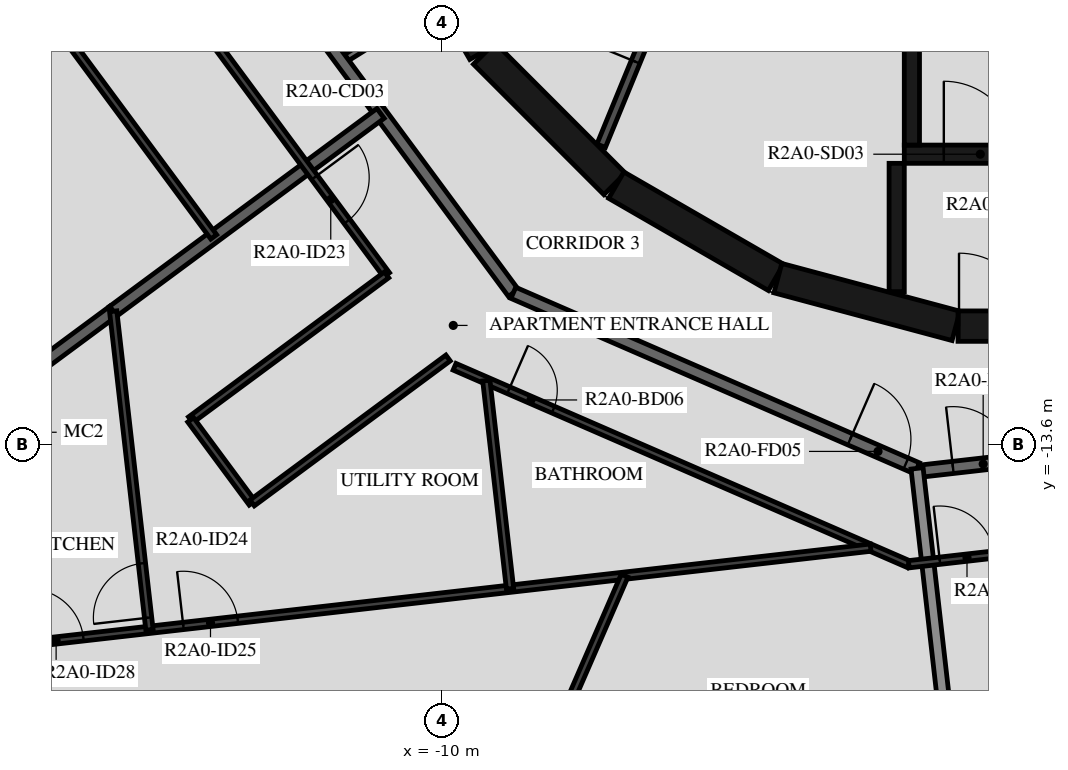
"""IFC4 building model, lengths in metres.
Left out: names, types, materials, properties, quantities, classifications, styles, units other than length and angle.
Written with IfcOpenShell. Run it as: python <this file> out.ifc"""

import sys

from ifc_helpers import new_model, si_unit, direction, frame, frame_2d, origin, place, context, subcontext, project, spatial, rectangle, extrude, element, fill, save


model = new_model("IFC4")
c1 = context("Model", 3, precision=1e-05, world=origin(), true_north=direction((0.0, 1.0)))
c2 = subcontext(c1, "Body", "Model", "MODEL_VIEW")
j1 = project(units=[si_unit("LENGTHUNIT", "METRE"), si_unit("PLANEANGLEUNIT", "RADIAN")], contexts=[c1])
p1 = place(None, origin())
s1 = spatial("IfcSite", under=j1, at=p1, CompositionType="ELEMENT")
p2 = place(p1, origin())
s2 = spatial("IfcBuilding", under=s1, at=p2, CompositionType="ELEMENT")
p3 = place(p2, frame((0.0, 0.0, 76.7)))
s3 = spatial("IfcBuildingStorey", under=s2, at=p3, CompositionType="ELEMENT", Elevation=76.7)
p4 = place(p3, frame((-10.845, -4.51, 0.0), z_axis=(0.0, 0.0, 1.0), x_axis=(0.500087131594, -0.865975092491, 0.0)))
e1 = element("IfcWall", 1, at=p4, inside=s3, PredefinedType="SHEAR", context=c2, shape_type="SweptSolid", body=[
    extrude(rectangle(XDim=3.033, YDim=0.5, at=frame_2d((1.516, 0.0))), origin(), (0.0, 0.0, 1.0), 3.12),
])
p5 = place(p3, frame((-9.308, -7.164, 0.0), z_axis=(0.0, 0.0, 1.0), x_axis=(0.707106781187, -0.707106781187, 0.0)))
e2 = element("IfcWall", 2, at=p5, inside=s3, PredefinedType="SHEAR", context=c2, shape_type="SweptSolid", body=[
    extrude(rectangle(XDim=3.032, YDim=0.5, at=frame_2d((1.516, 0.0))), origin(), (0.0, 0.0, 1.0), 3.12),
])
for number, where, z_axis, x_axis in (
    (3, (-7.137, -9.329, 0.0), (0.0, 0.0, 1.0), (0.866, -0.5, 0.0)),
    (4, (-4.479, -10.858, 0.0), (0.0, 0.0, 1.0), (0.966, -0.259, 0.0)),
):
    element("IfcWall", number, at=place(p3, frame(where, z_axis=z_axis, x_axis=x_axis)), inside=s3, PredefinedType="SHEAR", context=c2, shape_type="SweptSolid", body=[
        extrude(rectangle(XDim=3.033, YDim=0.5, at=frame_2d((1.516, 0.0))), origin(), (0.0, 0.0, 1.0), 3.12),
    ])
p6 = place(p3, frame((-1.516, -11.647, 0.0), z_axis=(0.0, 0.0, 1.0), x_axis=(1.0, 0.0, 0.0)))
e5 = element("IfcWall", 5, at=p6, inside=s3, PredefinedType="SHEAR", context=c2, shape_type="SweptSolid", body=[
    extrude(rectangle(XDim=3.033, YDim=0.5, at=frame_2d((1.516, 0.0))), origin(), (0.0, 0.0, 1.0), 3.12),
])
p7 = place(p6, frame((0.016, 0.0, 0.0)))
e6 = element("IfcOpeningElement", 6, at=p7, cuts=e5, PredefinedType="OPENING", context=c2, shape_type="SweptSolid", body=[
    extrude(rectangle(XDim=1.2, YDim=2.1, at=frame_2d((0.6, 1.05))), frame((0.0, 0.26, 0.0), z_axis=(0.0, -1.0, 0.0), x_axis=(1.0, 0.0, 0.0)), (0.0, 0.0, 1.0), 0.52),
])
p8 = place(p3, frame((-2.275, -8.67, 0.0), z_axis=(0.0, 0.0, 1.0), x_axis=(0.0, 1.0, 0.0)))
e7 = element("IfcWall", 7, at=p8, inside=s3, PredefinedType="SHEAR", context=c2, shape_type="SweptSolid", body=[
    extrude(rectangle(XDim=3.32, YDim=0.25, at=frame_2d((1.66, 0.0))), origin(), (0.0, 0.0, 1.0), 3.12),
])
p9 = place(p3, frame((-2.4, -8.82, 0.0), z_axis=(0.0, 0.0, 1.0), x_axis=(1.0, 0.0, 0.0)))
e8 = element("IfcWall", 8, at=p9, inside=s3, PredefinedType="SHEAR", context=c2, shape_type="SweptSolid", body=[
    extrude(rectangle(XDim=2.5, YDim=0.3, at=frame_2d((1.25, 0.0))), origin(), (0.0, 0.0, 1.0), 3.12),
])
p10 = place(p9, frame((0.65, 0.0, 0.0)))
e9 = element("IfcOpeningElement", 9, at=p10, cuts=e8, PredefinedType="OPENING", context=c2, shape_type="SweptSolid", body=[
    extrude(rectangle(XDim=1.2, YDim=2.1, at=frame_2d((0.6, 1.05))), frame((0.0, 0.16, 0.0), z_axis=(0.0, -1.0, 0.0), x_axis=(1.0, 0.0, 0.0)), (0.0, 0.0, 1.0), 0.32),
])
p11 = place(p3, frame((-2.525, -8.97, 0.0), z_axis=(0.0, 0.0, 1.0), x_axis=(0.0, -1.0, 0.0)))
e10 = element("IfcWall", 10, at=p11, inside=s3, PredefinedType="SHEAR", context=c2, shape_type="SweptSolid", body=[
    extrude(rectangle(XDim=2.11, YDim=0.25, at=frame_2d((1.055, 0.0))), origin(), (0.0, 0.0, 1.0), 3.12),
])
p12 = place(p3, frame((-7.385, -8.681, 0.0), z_axis=(0.0, 0.0, 1.0), x_axis=(0.379804590409, 0.925066739811, 0.0)))
e11 = element("IfcWall", 11, at=p12, inside=s3, PredefinedType="PARTITIONING", context=c2, shape_type="SweptSolid", body=[
    extrude(rectangle(XDim=3.885, YDim=0.15, at=frame_2d((1.942, 0.0))), origin(), (0.0, 0.0, 1.0), 3.12),
])
p13 = place(p12, frame((1.493, 0.0, 0.0)))
e12 = element("IfcOpeningElement", 12, at=p13, cuts=e11, PredefinedType="OPENING", context=c2, shape_type="SweptSolid", body=[
    extrude(rectangle(XDim=0.9, YDim=2.1, at=frame_2d((0.45, 1.05))), frame((0.0, 0.085, 0.0), z_axis=(0.0, -1.0, 0.0), x_axis=(1.0, 0.0, 0.0)), (0.0, 0.0, 1.0), 0.17),
])
p14 = place(p3, frame((-11.654, -7.282, 0.0), z_axis=(0.0, 0.0, 1.0), x_axis=(0.848117698675, 0.529807860638, 0.0)))
e13 = element("IfcWall", 13, at=p14, inside=s3, PredefinedType="PARTITIONING", context=c2, shape_type="SweptSolid", body=[
    extrude(rectangle(XDim=1.838, YDim=0.12, at=frame_2d((0.919, 0.0))), origin(), (0.0, 0.0, 1.0), 3.12),
])
p15 = place(p14, frame((0.115, 0.0, 0.0)))
e14 = element("IfcOpeningElement", 14, at=p15, cuts=e13, PredefinedType="OPENING", context=c2, shape_type="SweptSolid", body=[
    extrude(rectangle(XDim=1.2, YDim=2.1, at=frame_2d((0.6, 1.05))), frame((0.0, 0.07, 0.0), z_axis=(0.0, -1.0, 0.0), x_axis=(1.0, 0.0, 0.0)), (0.0, 0.0, 1.0), 0.14),
])
p16 = place(p3, frame((-13.196, -5.198, 0.0), z_axis=(0.0, 0.0, 1.0), x_axis=(0.594805187394, -0.803869883159, 0.0)))
e15 = element("IfcWall", 15, at=p16, inside=s3, PredefinedType="STANDARD", context=c2, shape_type="SweptSolid", body=[
    extrude(rectangle(XDim=7.342, YDim=0.2, at=frame_2d((3.671, 0.0))), origin(), (0.0, 0.0, 1.0), 3.12),
])
p17 = place(p3, frame((-8.829, -11.1, 0.0), z_axis=(0.0, 0.0, 1.0), x_axis=(0.917063622491, -0.398740908742, 0.0)))
e16 = element("IfcWall", 16, at=p17, inside=s3, PredefinedType="STANDARD", context=c2, shape_type="SweptSolid", body=[
    extrude(rectangle(XDim=7.24, YDim=0.2, at=frame_2d((3.62, 0.0))), origin(), (0.0, 0.0, 1.0), 3.12),
])
p18 = place(p17, frame((6.04, 0.0, 0.0)))
e17 = element("IfcOpeningElement", 17, at=p18, cuts=e16, PredefinedType="OPENING", context=c2, shape_type="SweptSolid", body=[
    extrude(rectangle(XDim=1.0, YDim=2.1, at=frame_2d((0.5, 1.05))), frame((0.0, 0.11, 0.0), z_axis=(0.0, -1.0, 0.0), x_axis=(1.0, 0.0, 0.0)), (0.0, 0.0, 1.0), 0.22),
])
p19 = place(p3, frame((-2.096, -14.028, 0.0), z_axis=(0.0, 0.0, 1.0), x_axis=(0.993569170114, 0.113226782163, 0.0)))
e18 = element("IfcWall", 18, at=p19, inside=s3, PredefinedType="STANDARD", context=c2, shape_type="SweptSolid", body=[
    extrude(rectangle(XDim=7.342, YDim=0.2, at=frame_2d((3.671, 0.0))), origin(), (0.0, 0.0, 1.0), 3.12),
])
p20 = place(p19, frame((0.5, 0.0, 0.0)))
e19 = element("IfcOpeningElement", 19, at=p20, cuts=e18, PredefinedType="OPENING", context=c2, shape_type="SweptSolid", body=[
    extrude(rectangle(XDim=1.0, YDim=2.1, at=frame_2d((0.5, 1.05))), frame((0.0, 0.11, 0.0), z_axis=(0.0, -1.0, 0.0), x_axis=(1.0, 0.0, 0.0)), (0.0, 0.0, 1.0), 0.22),
])
p21 = place(p3, frame((-15.41, -11.403, 0.0), z_axis=(0.0, 0.0, 1.0), x_axis=(0.803887568227, 0.594781285558, 0.0)))
e20 = element("IfcWall", 20, at=p21, inside=s3, PredefinedType="STANDARD", context=c2, shape_type="SweptSolid", body=[
    extrude(rectangle(XDim=5.47, YDim=0.2, at=frame_2d((2.735, 0.0))), origin(), (0.0, 0.0, 1.0), 3.12),
])
p22 = place(p3, frame((-16.649, -12.32, 0.0), z_axis=(0.0, 0.0, 1.0), x_axis=(0.803804030903, 0.594894175383, 0.0)))
e21 = element("IfcWall", 21, at=p22, inside=s3, PredefinedType="STANDARD", context=c2, shape_type="SweptSolid", body=[
    extrude(rectangle(XDim=1.542, YDim=0.2, at=frame_2d((0.771, 0.0))), origin(), (0.0, 0.0, 1.0), 3.12),
])
p23 = place(p3, frame((-1.555, -19.559, 0.0), z_axis=(0.0, 0.0, 1.0), x_axis=(-0.113221250863, 0.993569800443, 0.0)))
e22 = element("IfcWall", 22, at=p23, inside=s3, PredefinedType="STANDARD", context=c2, shape_type="SweptSolid", body=[
    extrude(rectangle(XDim=5.609, YDim=0.2, at=frame_2d((2.804, 0.0))), origin(), (0.0, 0.0, 1.0), 2.73),
])
p24 = place(p3, frame((-14.641, -5.767, 0.0), z_axis=(0.0, 0.0, 1.0), x_axis=(0.594825885962, -0.803854567313, 0.0)))
e23 = element("IfcWall", 23, at=p24, inside=s3, PredefinedType="PARTITIONING", context=c2, shape_type="SweptSolid", body=[
    extrude(rectangle(XDim=6.266, YDim=0.12, at=frame_2d((3.133, 0.0))), origin(), (0.0, 0.0, 1.0), 3.12),
])
p25 = place(p24, frame((4.273, 0.0, 0.0)))
e24 = element("IfcOpeningElement", 24, at=p25, cuts=e23, PredefinedType="OPENING", context=c2, shape_type="SweptSolid", body=[
    extrude(rectangle(XDim=0.9, YDim=2.1, at=frame_2d((0.45, 1.05))), frame((0.0, 0.07, 0.0), z_axis=(0.0, -1.0, 0.0), x_axis=(1.0, 0.0, 0.0)), (0.0, 0.0, 1.0), 0.14),
])
p26 = place(p3, frame((-18.084, -4.331, 0.0), z_axis=(0.0, 0.0, 1.0), x_axis=(0.594811782108, -0.803865003508, 0.0)))
e25 = element("IfcWall", 25, at=p26, inside=s3, PredefinedType="PARTITIONING", context=c2, shape_type="SweptSolid", body=[
    extrude(rectangle(XDim=7.276, YDim=0.12, at=frame_2d((3.638, 0.0))), origin(), (0.0, 0.0, 1.0), 3.12),
])
p27 = place(p3, frame((-10.914, -10.804, 0.0), z_axis=(0.0, 0.0, 1.0), x_axis=(-0.803864616889, -0.594812304609, 0.0)))
e26 = element("IfcWall", 26, at=p27, inside=s3, PredefinedType="PARTITIONING", context=c2, shape_type="SweptSolid", body=[
    extrude(rectangle(XDim=4.008, YDim=0.12, at=frame_2d((2.004, 0.0))), origin(), (0.0, 0.0, 1.0), 3.12),
])
p28 = place(p3, frame((-14.136, -13.188, 0.0), z_axis=(0.0, 0.0, 1.0), x_axis=(0.594863421241, -0.803826791087, 0.0)))
e27 = element("IfcWall", 27, at=p28, inside=s3, PredefinedType="PARTITIONING", context=c2, shape_type="SweptSolid", body=[
    extrude(rectangle(XDim=1.7, YDim=0.12, at=frame_2d((0.85, 0.0))), origin(), (0.0, 0.0, 1.0), 3.12),
])
p29 = place(p3, frame((-13.125, -14.555, 0.0), z_axis=(0.0, 0.0, 1.0), x_axis=(0.80389374229, 0.594772940799, 0.0)))
e28 = element("IfcWall", 28, at=p29, inside=s3, PredefinedType="PARTITIONING", context=c2, shape_type="SweptSolid", body=[
    extrude(rectangle(XDim=4.008, YDim=0.12, at=frame_2d((2.004, 0.0))), origin(), (0.0, 0.0, 1.0), 3.12),
])
p30 = place(p3, frame((-9.796, -12.315, 0.0), z_axis=(0.0, 0.0, 1.0), x_axis=(0.917059572812, -0.398750222463, 0.0)))
e29 = element("IfcWall", 29, at=p30, inside=s3, PredefinedType="PARTITIONING", context=c2, shape_type="SweptSolid", body=[
    extrude(rectangle(XDim=8.146, YDim=0.12, at=frame_2d((4.073, 0.0))), origin(), (0.0, 0.0, 1.0), 3.12),
])
p31 = place(p30, frame((0.969, 0.0, 0.0)))
e30 = element("IfcOpeningElement", 30, at=p31, cuts=e29, PredefinedType="OPENING", context=c2, shape_type="SweptSolid", body=[
    extrude(rectangle(XDim=0.8, YDim=2.1, at=frame_2d((0.4, 1.05))), frame((0.0, 0.07, 0.0), z_axis=(0.0, -1.0, 0.0), x_axis=(1.0, 0.0, 0.0)), (0.0, 0.0, 1.0), 0.14),
])
p32 = place(p3, frame((-2.326, -15.563, 0.0), z_axis=(0.0, 0.0, 1.0), x_axis=(0.993575068384, 0.113175012641, 0.0)))
e31 = element("IfcWall", 31, at=p32, inside=s3, PredefinedType="PARTITIONING", context=c2, shape_type="SweptSolid", body=[
    extrude(rectangle(XDim=3.799, YDim=0.12, at=frame_2d((1.899, 0.0))), origin(), (0.0, 0.0, 1.0), 3.12),
])
p33 = place(p32, frame((0.513, 0.0, 0.0)))
e32 = element("IfcOpeningElement", 32, at=p33, cuts=e31, PredefinedType="OPENING", context=c2, shape_type="SweptSolid", body=[
    extrude(rectangle(XDim=0.9, YDim=2.1, at=frame_2d((0.45, 1.05))), frame((0.0, 0.07, 0.0), z_axis=(0.0, -1.0, 0.0), x_axis=(1.0, 0.0, 0.0)), (0.0, 0.0, 1.0), 0.14),
])
p34 = place(p3, frame((-17.437, -16.94, 0.0), z_axis=(0.0, 0.0, 1.0), x_axis=(0.993573314119, 0.113190412448, 0.0)))
e33 = element("IfcWall", 33, at=p34, inside=s3, PredefinedType="PARTITIONING", context=c2, shape_type="SweptSolid", body=[
    extrude(rectangle(XDim=14.576, YDim=0.12, at=frame_2d((7.288, 0.0))), origin(), (0.0, 0.0, 1.0), 3.12),
])
p35 = place(p34, frame((3.201, 0.0, 0.0)))
e34 = element("IfcOpeningElement", 34, at=p35, cuts=e33, PredefinedType="OPENING", context=c2, shape_type="SweptSolid", body=[
    extrude(rectangle(XDim=0.9, YDim=2.1, at=frame_2d((0.45, 1.05))), frame((0.0, 0.07, 0.0), z_axis=(0.0, -1.0, 0.0), x_axis=(1.0, 0.0, 0.0)), (0.0, 0.0, 1.0), 0.14),
])
p36 = place(p34, frame((0.645, 0.0, 0.0)))
e35 = element("IfcOpeningElement", 35, at=p36, cuts=e33, PredefinedType="OPENING", context=c2, shape_type="SweptSolid", body=[
    extrude(rectangle(XDim=0.9, YDim=2.1, at=frame_2d((0.45, 1.05))), frame((0.0, 0.07, 0.0), z_axis=(0.0, -1.0, 0.0), x_axis=(1.0, 0.0, 0.0)), (0.0, 0.0, 1.0), 0.14),
])
p37 = place(p3, frame((-14.813, -16.641, 0.0), z_axis=(0.0, 0.0, 1.0), x_axis=(-0.113210971478, 0.993570971767, 0.0)))
e36 = element("IfcWall", 36, at=p37, inside=s3, PredefinedType="PARTITIONING", context=c2, shape_type="SweptSolid", body=[
    extrude(rectangle(XDim=5.273, YDim=0.12, at=frame_2d((2.636, 0.0))), origin(), (0.0, 0.0, 1.0), 3.12),
])
p38 = place(p37, frame((0.2, 0.0, 0.0)))
e37 = element("IfcOpeningElement", 37, at=p38, cuts=e36, PredefinedType="OPENING", context=c2, shape_type="SweptSolid", body=[
    extrude(rectangle(XDim=0.9, YDim=2.1, at=frame_2d((0.45, 1.05))), frame((0.0, 0.07, 0.0), z_axis=(0.0, -1.0, 0.0), x_axis=(1.0, 0.0, 0.0)), (0.0, 0.0, 1.0), 0.14),
])
p39 = place(p3, frame((-8.884, -15.966, 0.0), z_axis=(0.0, 0.0, 1.0), x_axis=(-0.113230836929, 0.993568708026, 0.0)))
e38 = element("IfcWall", 38, at=p39, inside=s3, PredefinedType="PARTITIONING", context=c2, shape_type="SweptSolid", body=[
    extrude(rectangle(XDim=3.446, YDim=0.12, at=frame_2d((1.723, 0.0))), origin(), (0.0, 0.0, 1.0), 3.12),
])
p40 = place(p3, frame((-9.026, -20.41, 0.0), z_axis=(0.0, 0.0, 1.0), x_axis=(0.398750711167, 0.917059360316, 0.0)))
e39 = element("IfcWall", 39, at=p40, inside=s3, PredefinedType="PARTITIONING", context=c2, shape_type="SweptSolid", body=[
    extrude(rectangle(XDim=5.081, YDim=0.12, at=frame_2d((2.54, 0.0))), origin(), (0.0, 0.0, 1.0), 3.12),
])
p41 = place(p40, frame((0.4, 0.0, 0.0)))
e40 = element("IfcOpeningElement", 40, at=p41, cuts=e39, PredefinedType="OPENING", context=c2, shape_type="SweptSolid", body=[
    extrude(rectangle(XDim=0.9, YDim=2.1, at=frame_2d((0.45, 1.05))), frame((0.0, 0.07, 0.0), z_axis=(0.0, -1.0, 0.0), x_axis=(1.0, 0.0, 0.0)), (0.0, 0.0, 1.0), 0.14),
])
p42 = place(p10, origin())
e41 = element("IfcDoor", 41, at=p42, inside=s3, OperationType="SINGLE_SWING_LEFT", PredefinedType="DOOR", context=c2, shape_type="SweptSolid", body=[
    extrude(rectangle(XDim=1.2, YDim=2.1, at=frame_2d((0.6, 1.05))), frame((0.0, 0.025, 0.0), z_axis=(0.0, -1.0, 0.0), x_axis=(1.0, 0.0, 0.0)), (0.0, 0.0, 1.0), 0.05),
])
fill(e9, e41)
p43 = place(p7, origin())
e42 = element("IfcDoor", 42, at=p43, inside=s3, OperationType="SINGLE_SWING_RIGHT", PredefinedType="DOOR", context=c2, shape_type="SweptSolid", body=[
    extrude(rectangle(XDim=1.2, YDim=2.1, at=frame_2d((0.6, 1.05))), frame((0.0, 0.025, 0.0), z_axis=(0.0, -1.0, 0.0), x_axis=(1.0, 0.0, 0.0)), (0.0, 0.0, 1.0), 0.05),
])
fill(e6, e42)
p44 = place(p13, origin())
e43 = element("IfcDoor", 43, at=p44, inside=s3, OperationType="SINGLE_SWING_LEFT", PredefinedType="DOOR", context=c2, shape_type="SweptSolid", body=[
    extrude(rectangle(XDim=0.9, YDim=2.1, at=frame_2d((0.45, 1.05))), frame((0.0, 0.025, 0.0), z_axis=(0.0, -1.0, 0.0), x_axis=(1.0, 0.0, 0.0)), (0.0, 0.0, 1.0), 0.05),
])
fill(e12, e43)
p45 = place(p18, origin())
e44 = element("IfcDoor", 44, at=p45, inside=s3, OperationType="SINGLE_SWING_LEFT", PredefinedType="DOOR", context=c2, shape_type="SweptSolid", body=[
    extrude(rectangle(XDim=1.0, YDim=2.1, at=frame_2d((0.5, 1.05))), frame((0.0, 0.025, 0.0), z_axis=(0.0, -1.0, 0.0), x_axis=(1.0, 0.0, 0.0)), (0.0, 0.0, 1.0), 0.05),
])
fill(e17, e44)
p46 = place(p25, origin())
e45 = element("IfcDoor", 45, at=p46, inside=s3, OperationType="SINGLE_SWING_LEFT", PredefinedType="DOOR", context=c2, shape_type="SweptSolid", body=[
    extrude(rectangle(XDim=0.9, YDim=2.1, at=frame_2d((0.45, 1.05))), frame((0.0, 0.025, 0.0), z_axis=(0.0, -1.0, 0.0), x_axis=(1.0, 0.0, 0.0)), (0.0, 0.0, 1.0), 0.05),
])
fill(e24, e45)
p47 = place(p31, origin())
e46 = element("IfcDoor", 46, at=p47, inside=s3, OperationType="SINGLE_SWING_LEFT", PredefinedType="DOOR", context=c2, shape_type="SweptSolid", body=[
    extrude(rectangle(XDim=0.8, YDim=2.1, at=frame_2d((0.4, 1.05))), frame((0.0, 0.025, 0.0), z_axis=(0.0, -1.0, 0.0), x_axis=(1.0, 0.0, 0.0)), (0.0, 0.0, 1.0), 0.05),
])
fill(e30, e46)
p48 = place(p38, origin())
e47 = element("IfcDoor", 47, at=p48, inside=s3, OperationType="SINGLE_SWING_LEFT", PredefinedType="DOOR", context=c2, shape_type="SweptSolid", body=[
    extrude(rectangle(XDim=0.9, YDim=2.1, at=frame_2d((0.45, 1.05))), frame((0.0, 0.025, 0.0), z_axis=(0.0, -1.0, 0.0), x_axis=(1.0, 0.0, 0.0)), (0.0, 0.0, 1.0), 0.05),
])
fill(e37, e47)
p49 = place(p35, origin())
e48 = element("IfcDoor", 48, at=p49, inside=s3, OperationType="SINGLE_SWING_LEFT", PredefinedType="DOOR", context=c2, shape_type="SweptSolid", body=[
    extrude(rectangle(XDim=0.9, YDim=2.1, at=frame_2d((0.45, 1.05))), frame((0.0, 0.025, 0.0), z_axis=(0.0, -1.0, 0.0), x_axis=(1.0, 0.0, 0.0)), (0.0, 0.0, 1.0), 0.05),
])
fill(e34, e48)
p50 = place(p36, origin())
e49 = element("IfcDoor", 49, at=p50, inside=s3, OperationType="SINGLE_SWING_RIGHT", PredefinedType="DOOR", context=c2, shape_type="SweptSolid", body=[
    extrude(rectangle(XDim=0.9, YDim=2.1, at=frame_2d((0.45, 1.05))), frame((0.0, 0.025, 0.0), z_axis=(0.0, -1.0, 0.0), x_axis=(1.0, 0.0, 0.0)), (0.0, 0.0, 1.0), 0.05),
])
fill(e35, e49)
p51 = place(p20, origin())
e50 = element("IfcDoor", 50, at=p51, inside=s3, OperationType="SINGLE_SWING_LEFT", PredefinedType="DOOR", context=c2, shape_type="SweptSolid", body=[
    extrude(rectangle(XDim=1.0, YDim=2.1, at=frame_2d((0.5, 1.05))), frame((0.0, 0.025, 0.0), z_axis=(0.0, -1.0, 0.0), x_axis=(1.0, 0.0, 0.0)), (0.0, 0.0, 1.0), 0.05),
])
fill(e19, e50)
p52 = place(p33, origin())
e51 = element("IfcDoor", 51, at=p52, inside=s3, OperationType="SINGLE_SWING_LEFT", PredefinedType="DOOR", context=c2, shape_type="SweptSolid", body=[
    extrude(rectangle(XDim=0.9, YDim=2.1, at=frame_2d((0.45, 1.05))), frame((0.0, 0.025, 0.0), z_axis=(0.0, -1.0, 0.0), x_axis=(1.0, 0.0, 0.0)), (0.0, 0.0, 1.0), 0.05),
])
fill(e32, e51)
p53 = place(p15, origin())
e52 = element("IfcDoor", 52, at=p53, inside=s3, OperationType="DOUBLE_DOOR_SINGLE_SWING", PredefinedType="DOOR", context=c2, shape_type="SweptSolid", body=[
    extrude(rectangle(XDim=1.2, YDim=2.1, at=frame_2d((0.6, 1.05))), frame((0.0, 0.025, 0.0), z_axis=(0.0, -1.0, 0.0), x_axis=(1.0, 0.0, 0.0)), (0.0, 0.0, 1.0), 0.05),
])
fill(e14, e52)
save(model, sys.argv[1])
